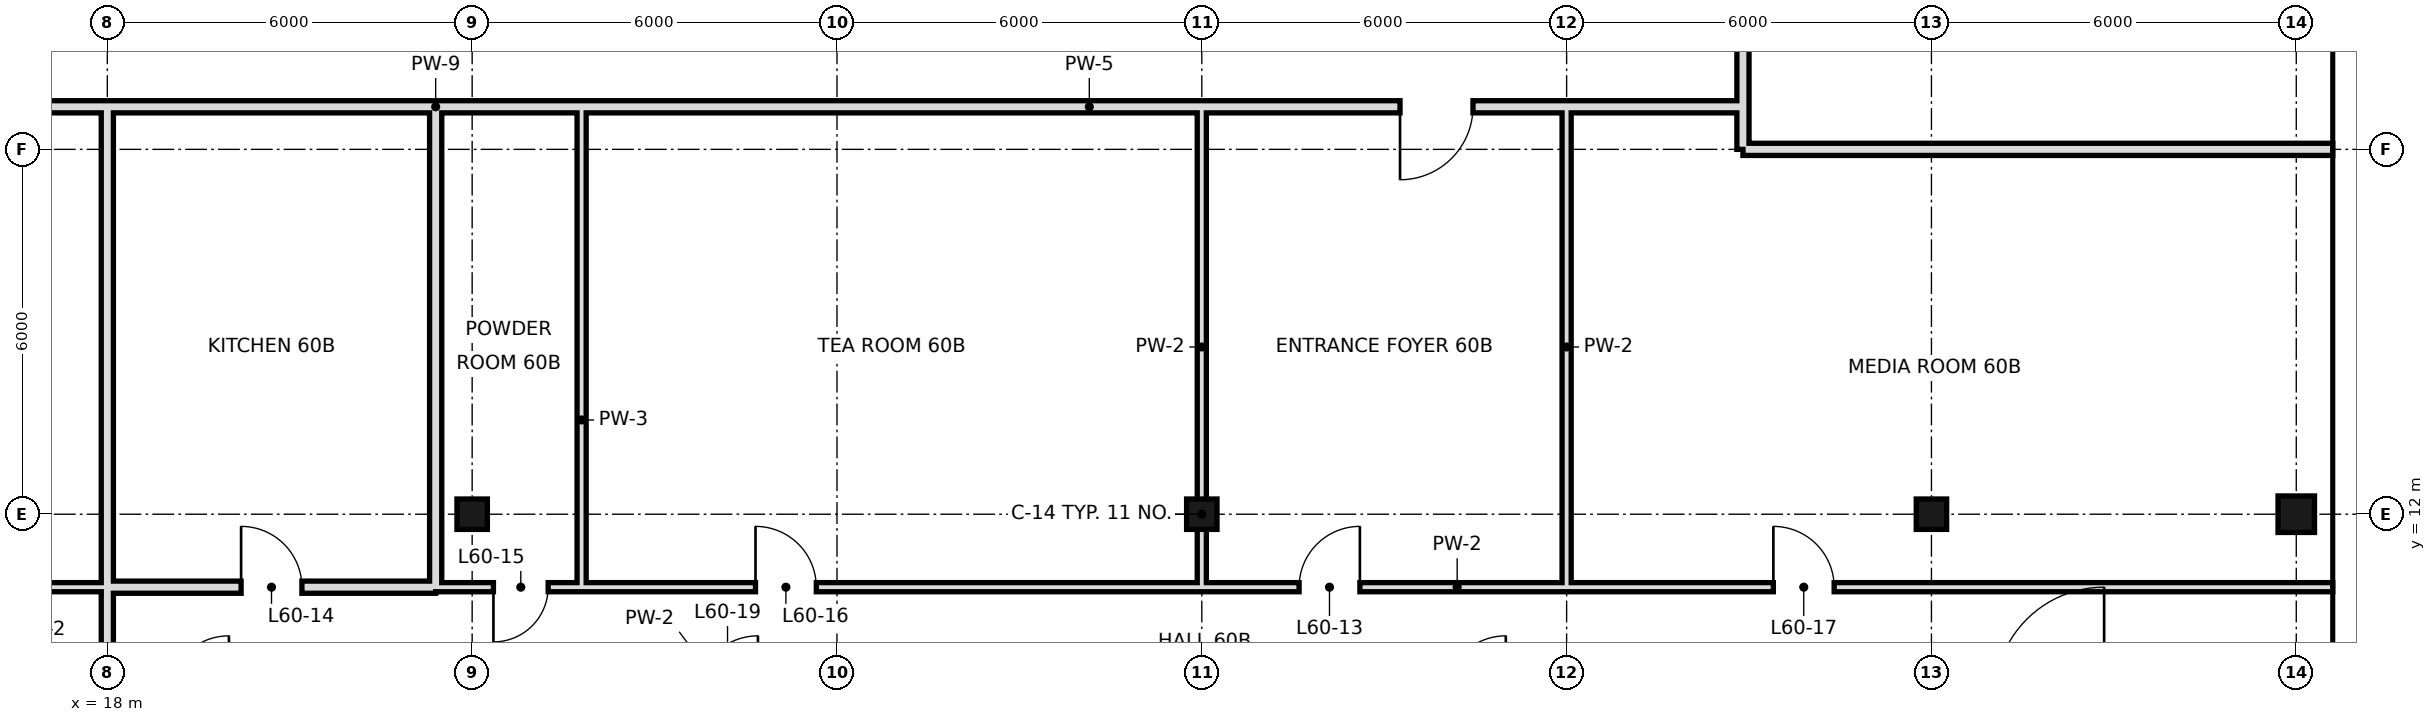
"""IFC4 building model, lengths in metres.
Left out: names, types, materials, properties, quantities, classifications, styles, units other than length and angle.
Written with IfcOpenShell. Run it as: python <this file> out.ifc"""

import sys

from ifc_helpers import new_model, si_unit, direction, frame, frame_2d, origin, origin_2d, place, context, subcontext, project, spatial, rectangle, hollow_rectangle, extrude, element, fill, save


model = new_model("IFC4")
c1 = context("Model", 3, precision=1e-05, world=origin(), true_north=direction((0.0, 1.0)))
c2 = subcontext(c1, "Body", "Model", "MODEL_VIEW")
j1 = project(units=[si_unit("LENGTHUNIT", "METRE"), si_unit("PLANEANGLEUNIT", "RADIAN")], contexts=[c1])
p1 = place(None, origin())
s1 = spatial("IfcSite", under=j1, at=p1, CompositionType="ELEMENT")
p2 = place(p1, origin())
s2 = spatial("IfcBuilding", under=s1, at=p2, CompositionType="ELEMENT")
p3 = place(p2, frame((0.0, 0.0, 254.0)))
s3 = spatial("IfcBuildingStorey", under=s2, at=p3, CompositionType="ELEMENT", Elevation=254.0)
for number, where, z_axis, x_axis in (
    (1, (24.0, 12.0, 0.0), (0.0, 0.0, 1.0), (1.0, 0.0, 0.0)),
    (2, (36.0, 12.0, 0.0), (0.0, 0.0, 1.0), (1.0, 0.0, 0.0)),
    (3, (48.0, 12.0, 0.0), (0.0, 0.0, 1.0), (1.0, 0.0, 0.0)),
):
    element("IfcColumn", number, at=place(p3, frame(where, z_axis=z_axis, x_axis=x_axis)), inside=s3, PredefinedType="COLUMN", context=c2, shape_type="SweptSolid", body=[
        extrude(hollow_rectangle(XDim=0.5, YDim=0.5, WallThickness=0.025, at=origin_2d()), origin(), (0.0, 0.0, 1.0), 3.6),
    ])
p4 = place(p3, frame((54.0, 12.0, 0.0), z_axis=(0.0, 0.0, 1.0), x_axis=(1.0, 0.0, 0.0)))
e4 = element("IfcColumn", 4, at=p4, inside=s3, PredefinedType="COLUMN", context=c2, shape_type="SweptSolid", body=[
    extrude(hollow_rectangle(XDim=0.6, YDim=0.6, WallThickness=0.028, at=origin_2d()), origin(), (0.0, 0.0, 1.0), 3.6),
])
p5 = place(p3, frame((18.0, 10.8, 0.0), z_axis=(0.0, 0.0, 1.0), x_axis=(0.0, 1.0, 0.0)))
e5 = element("IfcWall", 5, at=p5, inside=s3, PredefinedType="SOLIDWALL", context=c2, shape_type="SweptSolid", body=[
    extrude(rectangle(XDim=7.9, YDim=0.2, at=frame_2d((3.95, 0.0))), origin(), (0.0, 0.0, 1.0), 2.68),
])
p6 = place(p3, frame((18.0, -0.6, 0.0), z_axis=(0.0, 0.0, 1.0), x_axis=(0.0, 1.0, 0.0)))
e6 = element("IfcWall", 6, at=p6, inside=s3, PredefinedType="SOLIDWALL", context=c2, shape_type="SweptSolid", body=[
    extrude(rectangle(XDim=11.4, YDim=0.2, at=frame_2d((5.7, 0.0))), origin(), (0.0, 0.0, 1.0), 2.68),
])
p7 = place(p3, frame((23.4, 10.8, 0.0), z_axis=(0.0, 0.0, 1.0), x_axis=(0.0, 1.0, 0.0)))
e7 = element("IfcWall", 7, at=p7, inside=s3, PredefinedType="SOLIDWALL", context=c2, shape_type="SweptSolid", body=[
    extrude(rectangle(XDim=7.9, YDim=0.2, at=frame_2d((3.95, 0.0))), origin(), (0.0, 0.0, 1.0), 2.68),
])
p8 = place(p3, frame((25.8, 10.8, 0.0), z_axis=(0.0, 0.0, 1.0), x_axis=(0.0, 1.0, 0.0)))
e8 = element("IfcWall", 8, at=p8, inside=s3, PredefinedType="PARTITIONING", context=c2, shape_type="SweptSolid", body=[
    extrude(rectangle(XDim=7.9, YDim=0.15, at=frame_2d((3.95, 0.0))), origin(), (0.0, 0.0, 1.0), 3.38),
])
for number, where, z_axis, x_axis in (
    (9, (36.0, 10.8, 0.0), (0.0, 0.0, 1.0), (0.0, 1.0, 0.0)),
    (10, (42.0, 10.8, 0.0), (0.0, 0.0, 1.0), (0.0, 1.0, 0.0)),
):
    element("IfcWall", number, at=place(p3, frame(where, z_axis=z_axis, x_axis=x_axis)), inside=s3, PredefinedType="PARTITIONING", context=c2, shape_type="SweptSolid", body=[
        extrude(rectangle(XDim=7.9, YDim=0.15, at=frame_2d((3.95, 0.0))), origin(), (0.0, 0.0, 1.0), 2.68),
    ])
p9 = place(p3, frame((44.9, 18.0, 0.0), z_axis=(0.0, 0.0, 1.0), x_axis=(0.0, 1.0, 0.0)))
e11 = element("IfcWall", 11, at=p9, inside=s3, PredefinedType="SOLIDWALL", context=c2, shape_type="SweptSolid", body=[
    extrude(rectangle(XDim=30.6, YDim=0.2, at=frame_2d((15.3, 0.0))), origin(), (0.0, 0.0, 1.0), 2.68),
])
p10 = place(p9, frame((14.75, 0.0, 0.0)))
e12 = element("IfcOpeningElement", 12, at=p10, cuts=e11, PredefinedType="OPENING", context=c2, shape_type="SweptSolid", body=[
    extrude(rectangle(XDim=1.2, YDim=2.4, at=frame_2d((0.6, 1.2))), frame((0.0, 0.11, 0.0), z_axis=(0.0, -1.0, 0.0), x_axis=(1.0, 0.0, 0.0)), (0.0, 0.0, 1.0), 0.22),
])
p11 = place(p3, frame((18.0, 10.8, 0.0), z_axis=(0.0, 0.0, 1.0), x_axis=(1.0, 0.0, 0.0)))
e13 = element("IfcWall", 13, at=p11, inside=s3, PredefinedType="SOLIDWALL", context=c2, shape_type="SweptSolid", body=[
    extrude(rectangle(XDim=5.4, YDim=0.2, at=frame_2d((2.7, 0.0))), origin(), (0.0, 0.0, 1.0), 2.68),
])
p12 = place(p11, frame((2.2, 0.0, 0.0)))
e14 = element("IfcOpeningElement", 14, at=p12, cuts=e13, PredefinedType="OPENING", context=c2, shape_type="SweptSolid", body=[
    extrude(rectangle(XDim=1.0, YDim=2.4, at=frame_2d((0.5, 1.2))), frame((0.0, 0.11, 0.0), z_axis=(0.0, -1.0, 0.0), x_axis=(1.0, 0.0, 0.0)), (0.0, 0.0, 1.0), 0.22),
])
p13 = place(p3, frame((14.4, 10.8, 0.0), z_axis=(0.0, 0.0, 1.0), x_axis=(1.0, 0.0, 0.0)))
e15 = element("IfcWall", 15, at=p13, inside=s3, PredefinedType="PARTITIONING", context=c2, shape_type="SweptSolid", body=[
    extrude(rectangle(XDim=3.6, YDim=0.15, at=frame_2d((1.8, 0.0))), origin(), (0.0, 0.0, 1.0), 3.38),
])
p14 = place(p13, frame((0.88, 0.0, 0.0)))
e16 = element("IfcOpeningElement", 16, at=p14, cuts=e15, PredefinedType="OPENING", context=c2, shape_type="SweptSolid", body=[
    extrude(rectangle(XDim=1.0, YDim=2.4, at=frame_2d((0.5, 1.2))), frame((0.0, 0.085, 0.0), z_axis=(0.0, -1.0, 0.0), x_axis=(1.0, 0.0, 0.0)), (0.0, 0.0, 1.0), 0.17),
])
p15 = place(p3, frame((25.8, 10.8, 0.0), z_axis=(0.0, 0.0, 1.0), x_axis=(1.0, 0.0, 0.0)))
e17 = element("IfcWall", 17, at=p15, inside=s3, PredefinedType="PARTITIONING", context=c2, shape_type="SweptSolid", body=[
    extrude(rectangle(XDim=28.8, YDim=0.15, at=frame_2d((14.4, 0.0))), origin(), (0.0, 0.0, 1.0), 3.38),
])
p16 = place(p15, frame((11.8, 0.0, 0.0)))
e18 = element("IfcOpeningElement", 18, at=p16, cuts=e17, PredefinedType="OPENING", context=c2, shape_type="SweptSolid", body=[
    extrude(rectangle(XDim=1.0, YDim=2.4, at=frame_2d((0.5, 1.2))), frame((0.0, 0.085, 0.0), z_axis=(0.0, -1.0, 0.0), x_axis=(1.0, 0.0, 0.0)), (0.0, 0.0, 1.0), 0.17),
])
p17 = place(p15, frame((2.86, 0.0, 0.0)))
e19 = element("IfcOpeningElement", 19, at=p17, cuts=e17, PredefinedType="OPENING", context=c2, shape_type="SweptSolid", body=[
    extrude(rectangle(XDim=1.0, YDim=2.4, at=frame_2d((0.5, 1.2))), frame((0.0, 0.085, 0.0), z_axis=(0.0, -1.0, 0.0), x_axis=(1.0, 0.0, 0.0)), (0.0, 0.0, 1.0), 0.17),
])
p18 = place(p15, frame((19.6, 0.0, 0.0)))
e20 = element("IfcOpeningElement", 20, at=p18, cuts=e17, PredefinedType="OPENING", context=c2, shape_type="SweptSolid", body=[
    extrude(rectangle(XDim=1.0, YDim=2.4, at=frame_2d((0.5, 1.2))), frame((0.0, 0.085, 0.0), z_axis=(0.0, -1.0, 0.0), x_axis=(1.0, 0.0, 0.0)), (0.0, 0.0, 1.0), 0.17),
])
p19 = place(p3, frame((23.4, 10.8, 0.0), z_axis=(0.0, 0.0, 1.0), x_axis=(1.0, 0.0, 0.0)))
e21 = element("IfcWall", 21, at=p19, inside=s3, PredefinedType="PARTITIONING", context=c2, shape_type="SweptSolid", body=[
    extrude(rectangle(XDim=2.4, YDim=0.15, at=frame_2d((1.2, 0.0))), origin(), (0.0, 0.0, 1.0), 3.38),
])
p20 = place(p19, frame((0.95, 0.0, 0.0)))
e22 = element("IfcOpeningElement", 22, at=p20, cuts=e21, PredefinedType="OPENING", context=c2, shape_type="SweptSolid", body=[
    extrude(rectangle(XDim=0.9, YDim=2.4, at=frame_2d((0.45, 1.2))), frame((0.0, 0.085, 0.0), z_axis=(0.0, -1.0, 0.0), x_axis=(1.0, 0.0, 0.0)), (0.0, 0.0, 1.0), 0.17),
])
p21 = place(p3, frame((44.9, 18.0, 0.0), z_axis=(0.0, 0.0, 1.0), x_axis=(1.0, 0.0, 0.0)))
e23 = element("IfcWall", 23, at=p21, inside=s3, PredefinedType="SOLIDWALL", context=c2, shape_type="SweptSolid", body=[
    extrude(rectangle(XDim=9.7, YDim=0.2, at=frame_2d((4.85, 0.0))), origin(), (0.0, 0.0, 1.0), 2.68),
])
p22 = place(p3, frame((12.0, 18.7, 0.0), z_axis=(0.0, 0.0, 1.0), x_axis=(1.0, 0.0, 0.0)))
e24 = element("IfcWall", 24, at=p22, inside=s3, PredefinedType="SOLIDWALL", context=c2, shape_type="SweptSolid", body=[
    extrude(rectangle(XDim=6.0, YDim=0.2, at=frame_2d((3.0, 0.0))), origin(), (0.0, 0.0, 1.0), 2.68),
])
p23 = place(p22, frame((3.22, 0.0, 0.0)))
e25 = element("IfcOpeningElement", 25, at=p23, cuts=e24, PredefinedType="OPENING", context=c2, shape_type="SweptSolid", body=[
    extrude(rectangle(XDim=1.2, YDim=2.4, at=frame_2d((0.6, 1.2))), frame((0.0, 0.11, 0.0), z_axis=(0.0, -1.0, 0.0), x_axis=(1.0, 0.0, 0.0)), (0.0, 0.0, 1.0), 0.22),
])
p24 = place(p3, frame((23.4, 18.7, 0.0), z_axis=(0.0, 0.0, 1.0), x_axis=(1.0, 0.0, 0.0)))
e26 = element("IfcWall", 26, at=p24, inside=s3, PredefinedType="SOLIDWALL", context=c2, shape_type="SweptSolid", body=[
    extrude(rectangle(XDim=21.5, YDim=0.2, at=frame_2d((10.75, 0.0))), origin(), (0.0, 0.0, 1.0), 2.68),
])
p25 = place(p24, frame((15.86, 0.0, 0.0)))
e27 = element("IfcOpeningElement", 27, at=p25, cuts=e26, PredefinedType="OPENING", context=c2, shape_type="SweptSolid", body=[
    extrude(rectangle(XDim=1.2, YDim=2.4, at=frame_2d((0.6, 1.2))), frame((0.0, 0.11, 0.0), z_axis=(0.0, -1.0, 0.0), x_axis=(1.0, 0.0, 0.0)), (0.0, 0.0, 1.0), 0.22),
])
p26 = place(p3, frame((18.0, 18.7, 0.0), z_axis=(0.0, 0.0, 1.0), x_axis=(1.0, 0.0, 0.0)))
e28 = element("IfcWall", 28, at=p26, inside=s3, PredefinedType="SOLIDWALL", context=c2, shape_type="SweptSolid", body=[
    extrude(rectangle(XDim=5.4, YDim=0.2, at=frame_2d((2.7, 0.0))), origin(), (0.0, 0.0, 1.0), 2.68),
])
p27 = place(p16, frame((1.0, 0.0, 0.0), z_axis=(0.0, 0.0, 1.0), x_axis=(-1.0, 0.0, 0.0)))
e29 = element("IfcDoor", 29, at=p27, inside=s3, OperationType="SINGLE_SWING_LEFT", PredefinedType="DOOR", context=c2, shape_type="SweptSolid", body=[
    extrude(rectangle(XDim=1.0, YDim=2.4, at=frame_2d((0.5, 1.2))), frame((0.0, 0.025, 0.0), z_axis=(0.0, -1.0, 0.0), x_axis=(1.0, 0.0, 0.0)), (0.0, 0.0, 1.0), 0.05),
])
fill(e18, e29)
p28 = place(p12, origin())
e30 = element("IfcDoor", 30, at=p28, inside=s3, OperationType="SINGLE_SWING_LEFT", PredefinedType="DOOR", context=c2, shape_type="SweptSolid", body=[
    extrude(rectangle(XDim=1.0, YDim=2.4, at=frame_2d((0.5, 1.2))), frame((0.0, 0.025, 0.0), z_axis=(0.0, -1.0, 0.0), x_axis=(1.0, 0.0, 0.0)), (0.0, 0.0, 1.0), 0.05),
])
fill(e14, e30)
p29 = place(p20, frame((0.9, 0.0, 0.0), z_axis=(0.0, 0.0, 1.0), x_axis=(-1.0, 0.0, 0.0)))
e31 = element("IfcDoor", 31, at=p29, inside=s3, OperationType="SINGLE_SWING_RIGHT", PredefinedType="DOOR", context=c2, shape_type="SweptSolid", body=[
    extrude(rectangle(XDim=0.9, YDim=2.4, at=frame_2d((0.45, 1.2))), frame((0.0, 0.025, 0.0), z_axis=(0.0, -1.0, 0.0), x_axis=(1.0, 0.0, 0.0)), (0.0, 0.0, 1.0), 0.05),
])
fill(e22, e31)
p30 = place(p17, origin())
e32 = element("IfcDoor", 32, at=p30, inside=s3, OperationType="SINGLE_SWING_LEFT", PredefinedType="DOOR", context=c2, shape_type="SweptSolid", body=[
    extrude(rectangle(XDim=1.0, YDim=2.4, at=frame_2d((0.5, 1.2))), frame((0.0, 0.025, 0.0), z_axis=(0.0, -1.0, 0.0), x_axis=(1.0, 0.0, 0.0)), (0.0, 0.0, 1.0), 0.05),
])
fill(e19, e32)
p31 = place(p18, origin())
e33 = element("IfcDoor", 33, at=p31, inside=s3, OperationType="SINGLE_SWING_LEFT", PredefinedType="DOOR", context=c2, shape_type="SweptSolid", body=[
    extrude(rectangle(XDim=1.0, YDim=2.4, at=frame_2d((0.5, 1.2))), frame((0.0, 0.025, 0.0), z_axis=(0.0, -1.0, 0.0), x_axis=(1.0, 0.0, 0.0)), (0.0, 0.0, 1.0), 0.05),
])
fill(e20, e33)
p32 = place(p25, frame((1.2, 0.0, 0.0), z_axis=(0.0, 0.0, 1.0), x_axis=(-1.0, 0.0, 0.0)))
e34 = element("IfcDoor", 34, at=p32, inside=s3, OperationType="SINGLE_SWING_RIGHT", PredefinedType="DOOR", context=c2, shape_type="SweptSolid", body=[
    extrude(rectangle(XDim=1.2, YDim=2.4, at=frame_2d((0.6, 1.2))), frame((0.0, 0.025, 0.0), z_axis=(0.0, -1.0, 0.0), x_axis=(1.0, 0.0, 0.0)), (0.0, 0.0, 1.0), 0.05),
])
fill(e27, e34)
save(model, sys.argv[1])
